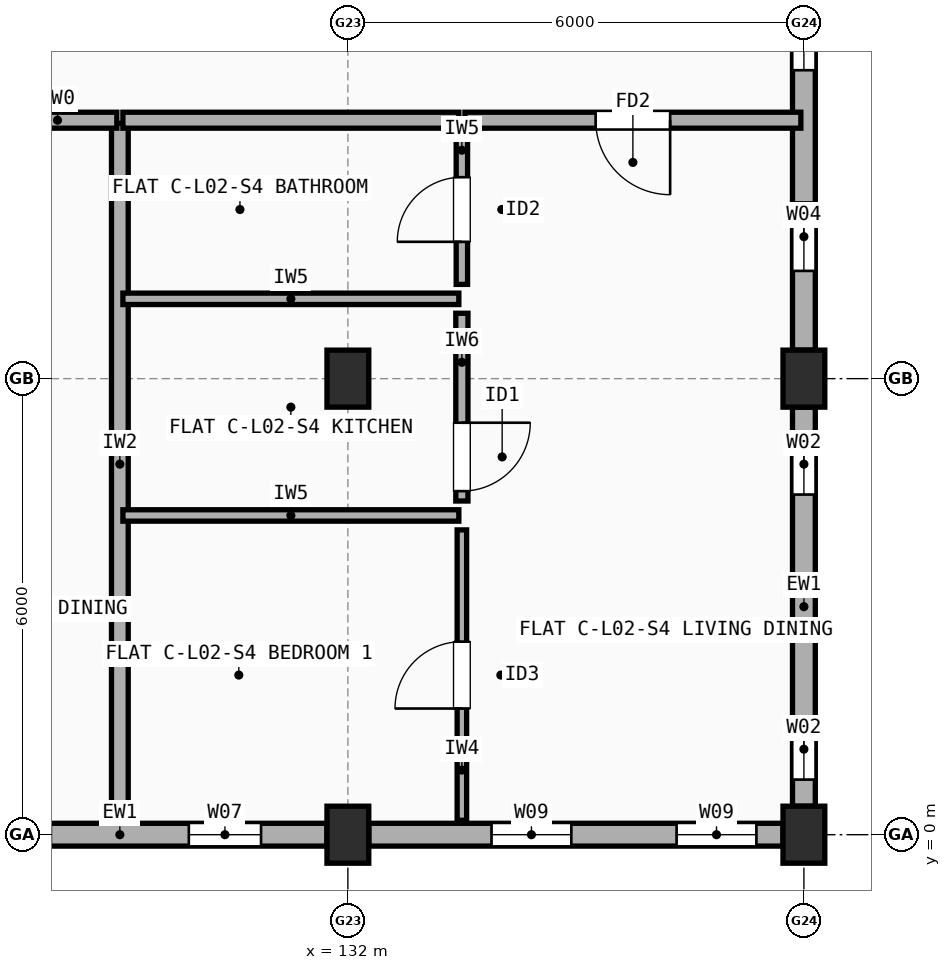
"""IFC4 building model, lengths in metres.
Left out: names, types, materials, properties, quantities, classifications, styles, units other than length and angle.
Written with IfcOpenShell. Run it as: python <this file> out.ifc"""

import sys

from ifc_helpers import new_model, si_unit, direction, frame, frame_2d, origin, origin_2d, place, context, subcontext, project, spatial, rectangle, extrude, element, fill, save


model = new_model("IFC4")
c1 = context("Model", 3, precision=1e-05, world=origin(), true_north=direction((0.0, 1.0)))
c2 = subcontext(c1, "Body", "Model", "MODEL_VIEW")
j1 = project(units=[si_unit("LENGTHUNIT", "METRE"), si_unit("PLANEANGLEUNIT", "RADIAN")], contexts=[c1])
p1 = place(None, origin())
s1 = spatial("IfcSite", under=j1, at=p1, CompositionType="ELEMENT")
p2 = place(p1, origin())
s2 = spatial("IfcBuilding", under=s1, at=p2, CompositionType="ELEMENT")
p3 = place(p2, frame((0.0, 0.0, 7.7)))
s3 = spatial("IfcBuildingStorey", under=s2, at=p3, CompositionType="ELEMENT", Elevation=7.7)
for number, where, z_axis, x_axis in (
    (1, (132.0, 0.0, 0.0), (0.0, 0.0, 1.0), (1.0, 0.0, 0.0)),
    (2, (132.0, 6.0, 0.0), (0.0, 0.0, 1.0), (1.0, 0.0, 0.0)),
    (3, (138.0, 0.0, 0.0), (0.0, 0.0, 1.0), (1.0, 0.0, 0.0)),
    (4, (138.0, 6.0, 0.0), (0.0, 0.0, 1.0), (1.0, 0.0, 0.0)),
):
    element("IfcColumn", number, at=place(p3, frame(where, z_axis=z_axis, x_axis=x_axis)), inside=s3, PredefinedType="COLUMN", context=c2, shape_type="SweptSolid", body=[
        extrude(rectangle(XDim=0.55, YDim=0.75, at=origin_2d()), origin(), (0.0, 0.0, 1.0), 2.955),
    ])
p4 = place(p3, frame((126.325, 0.0, 0.0), z_axis=(0.0, 0.0, 1.0), x_axis=(1.0, 0.0, 0.0)))
e5 = element("IfcWall", 5, at=p4, inside=s3, PredefinedType="STANDARD", context=c2, shape_type="SweptSolid", body=[
    extrude(rectangle(XDim=5.4, YDim=0.3, at=frame_2d((2.7, 0.0))), origin(), (0.0, 0.0, 1.0), 2.437),
])
p5 = place(p4, frame((0.867, 0.0, 0.9)))
e6 = element("IfcOpeningElement", 6, at=p5, cuts=e5, PredefinedType="OPENING", context=c2, shape_type="SweptSolid", body=[
    extrude(rectangle(XDim=0.9, YDim=1.3, at=frame_2d((0.45, 0.65))), frame((0.0, 0.16, 0.0), z_axis=(0.0, -1.0, 0.0), x_axis=(1.0, 0.0, 0.0)), (0.0, 0.0, 1.0), 0.32),
])
p6 = place(p4, frame((3.583, 0.0, 0.9)))
e7 = element("IfcOpeningElement", 7, at=p6, cuts=e5, PredefinedType="OPENING", context=c2, shape_type="SweptSolid", body=[
    extrude(rectangle(XDim=0.95, YDim=1.35, at=frame_2d((0.475, 0.675))), frame((0.0, 0.16, 0.0), z_axis=(0.0, -1.0, 0.0), x_axis=(1.0, 0.0, 0.0)), (0.0, 0.0, 1.0), 0.32),
])
p7 = place(p3, frame((132.275, 0.0, 0.0), z_axis=(0.0, 0.0, 1.0), x_axis=(1.0, 0.0, 0.0)))
e8 = element("IfcWall", 8, at=p7, inside=s3, PredefinedType="STANDARD", context=c2, shape_type="SweptSolid", body=[
    extrude(rectangle(XDim=5.45, YDim=0.3, at=frame_2d((2.725, 0.0))), origin(), (0.0, 0.0, 1.0), 2.437),
])
p8 = place(p7, frame((1.615, 0.0, 0.9)))
e9 = element("IfcOpeningElement", 9, at=p8, cuts=e8, PredefinedType="OPENING", context=c2, shape_type="SweptSolid", body=[
    extrude(rectangle(XDim=1.05, YDim=1.35, at=frame_2d((0.525, 0.675))), frame((0.0, 0.16, 0.0), z_axis=(0.0, -1.0, 0.0), x_axis=(1.0, 0.0, 0.0)), (0.0, 0.0, 1.0), 0.32),
])
p9 = place(p7, frame((4.05, 0.0, 0.9)))
e10 = element("IfcOpeningElement", 10, at=p9, cuts=e8, PredefinedType="OPENING", context=c2, shape_type="SweptSolid", body=[
    extrude(rectangle(XDim=1.05, YDim=1.35, at=frame_2d((0.525, 0.675))), frame((0.0, 0.16, 0.0), z_axis=(0.0, -1.0, 0.0), x_axis=(1.0, 0.0, 0.0)), (0.0, 0.0, 1.0), 0.32),
])
p10 = place(p3, frame((138.0, 0.375, 0.0), z_axis=(0.0, 0.0, 1.0), x_axis=(0.0, 1.0, 0.0)))
e11 = element("IfcWall", 11, at=p10, inside=s3, PredefinedType="STANDARD", context=c2, shape_type="SweptSolid", body=[
    extrude(rectangle(XDim=5.25, YDim=0.3, at=frame_2d((2.625, 0.0))), origin(), (0.0, 0.0, 1.0), 2.437),
])
p11 = place(p10, frame((0.35, 0.0, 0.9)))
e12 = element("IfcOpeningElement", 12, at=p11, cuts=e11, PredefinedType="OPENING", context=c2, shape_type="SweptSolid", body=[
    extrude(rectangle(XDim=0.8, YDim=1.2, at=frame_2d((0.4, 0.6))), frame((0.0, 0.16, 0.0), z_axis=(0.0, -1.0, 0.0), x_axis=(1.0, 0.0, 0.0)), (0.0, 0.0, 1.0), 0.32),
])
p12 = place(p10, frame((4.1, 0.0, 0.9)))
e13 = element("IfcOpeningElement", 13, at=p12, cuts=e11, PredefinedType="OPENING", context=c2, shape_type="SweptSolid", body=[
    extrude(rectangle(XDim=0.8, YDim=1.2, at=frame_2d((0.4, 0.6))), frame((0.0, 0.16, 0.0), z_axis=(0.0, -1.0, 0.0), x_axis=(1.0, 0.0, 0.0)), (0.0, 0.0, 1.0), 0.32),
])
p13 = place(p3, frame((138.0, 6.375, 0.0), z_axis=(0.0, 0.0, 1.0), x_axis=(0.0, 1.0, 0.0)))
e14 = element("IfcWall", 14, at=p13, inside=s3, PredefinedType="STANDARD", context=c2, shape_type="SweptSolid", body=[
    extrude(rectangle(XDim=5.25, YDim=0.3, at=frame_2d((2.625, 0.0))), origin(), (0.0, 0.0, 1.0), 2.437),
])
p14 = place(p13, frame((1.042, 0.0, 0.9)))
e15 = element("IfcOpeningElement", 15, at=p14, cuts=e14, PredefinedType="OPENING", context=c2, shape_type="SweptSolid", body=[
    extrude(rectangle(XDim=0.9, YDim=1.3, at=frame_2d((0.45, 0.65))), frame((0.0, 0.16, 0.0), z_axis=(0.0, -1.0, 0.0), x_axis=(1.0, 0.0, 0.0)), (0.0, 0.0, 1.0), 0.32),
])
p15 = place(p13, frame((3.683, 0.0, 0.9)))
e16 = element("IfcOpeningElement", 16, at=p15, cuts=e14, PredefinedType="OPENING", context=c2, shape_type="SweptSolid", body=[
    extrude(rectangle(XDim=0.95, YDim=1.35, at=frame_2d((0.475, 0.675))), frame((0.0, 0.16, 0.0), z_axis=(0.0, -1.0, 0.0), x_axis=(1.0, 0.0, 0.0)), (0.0, 0.0, 1.0), 0.32),
])
p16 = place(p3, frame((129.0, 0.39, 0.0), z_axis=(0.0, 0.0, 1.0), x_axis=(0.0, 1.0, 0.0)))
e17 = element("IfcWall", 17, at=p16, inside=s3, PredefinedType="SOLIDWALL", context=c2, shape_type="SweptSolid", body=[
    extrude(rectangle(XDim=8.97, YDim=0.22, at=frame_2d((4.485, 0.0))), origin(), (0.0, 0.0, 1.0), 2.437),
])
p17 = place(p3, frame((124.54, 9.4, 0.0), z_axis=(0.0, 0.0, 1.0), x_axis=(1.0, 0.0, 0.0)))
e18 = element("IfcWall", 18, at=p17, inside=s3, PredefinedType="SOLIDWALL", context=c2, shape_type="SweptSolid", body=[
    extrude(rectangle(XDim=4.42, YDim=0.21, at=frame_2d((2.21, 0.0))), origin(), (0.0, 0.0, 1.0), 2.337),
])
p18 = place(p17, frame((1.71, 0.0, 0.0)))
e19 = element("IfcOpeningElement", 19, at=p18, cuts=e18, PredefinedType="OPENING", context=c2, shape_type="SweptSolid", body=[
    extrude(rectangle(XDim=1.0, YDim=2.15, at=frame_2d((0.5, 1.075))), frame((0.0, 0.115, 0.0), z_axis=(0.0, -1.0, 0.0), x_axis=(1.0, 0.0, 0.0)), (0.0, 0.0, 1.0), 0.23),
])
p19 = place(p3, frame((129.04, 9.4, 0.0), z_axis=(0.0, 0.0, 1.0), x_axis=(1.0, 0.0, 0.0)))
e20 = element("IfcWall", 20, at=p19, inside=s3, PredefinedType="SOLIDWALL", context=c2, shape_type="SweptSolid", body=[
    extrude(rectangle(XDim=4.42, YDim=0.21, at=frame_2d((2.21, 0.0))), origin(), (0.0, 0.0, 1.0), 2.437),
])
p20 = place(p3, frame((133.54, 9.4, 0.0), z_axis=(0.0, 0.0, 1.0), x_axis=(1.0, 0.0, 0.0)))
e21 = element("IfcWall", 21, at=p20, inside=s3, PredefinedType="SOLIDWALL", context=c2, shape_type="SweptSolid", body=[
    extrude(rectangle(XDim=4.42, YDim=0.21, at=frame_2d((2.21, 0.0))), origin(), (0.0, 0.0, 1.0), 2.437),
])
p21 = place(p20, frame((1.72, 0.0, 0.0)))
e22 = element("IfcOpeningElement", 22, at=p21, cuts=e21, PredefinedType="OPENING", context=c2, shape_type="SweptSolid", body=[
    extrude(rectangle(XDim=0.98, YDim=2.15, at=frame_2d((0.49, 1.075))), frame((0.0, 0.115, 0.0), z_axis=(0.0, -1.0, 0.0), x_axis=(1.0, 0.0, 0.0)), (0.0, 0.0, 1.0), 0.23),
])
p22 = place(p3, frame((133.5, 0.19, 0.0), z_axis=(0.0, 0.0, 1.0), x_axis=(0.0, 1.0, 0.0)))
e23 = element("IfcWall", 23, at=p22, inside=s3, PredefinedType="PARTITIONING", context=c2, shape_type="SweptSolid", body=[
    extrude(rectangle(XDim=3.82, YDim=0.125, at=frame_2d((1.91, 0.0))), origin(), (0.0, 0.0, 1.0), 2.955),
])
p23 = place(p22, frame((1.47, 0.0, 0.0)))
e24 = element("IfcOpeningElement", 24, at=p23, cuts=e23, PredefinedType="OPENING", context=c2, shape_type="SweptSolid", body=[
    extrude(rectangle(XDim=0.88, YDim=2.1, at=frame_2d((0.44, 1.05))), frame((0.0, 0.073, 0.0), z_axis=(0.0, -1.0, 0.0), x_axis=(1.0, 0.0, 0.0)), (0.0, 0.0, 1.0), 0.145),
])
p24 = place(p3, frame((133.5, 4.39, 0.0), z_axis=(0.0, 0.0, 1.0), x_axis=(0.0, 1.0, 0.0)))
e25 = element("IfcWall", 25, at=p24, inside=s3, PredefinedType="PLUMBINGWALL", context=c2, shape_type="SweptSolid", body=[
    extrude(rectangle(XDim=2.47, YDim=0.16, at=frame_2d((1.235, 0.0))), origin(), (0.0, 0.0, 1.0), 2.437),
])
p25 = place(p24, frame((0.13, 0.0, 0.0)))
e26 = element("IfcOpeningElement", 26, at=p25, cuts=e25, PredefinedType="OPENING", context=c2, shape_type="SweptSolid", body=[
    extrude(rectangle(XDim=0.9, YDim=2.1, at=frame_2d((0.45, 1.05))), frame((0.0, 0.09, 0.0), z_axis=(0.0, -1.0, 0.0), x_axis=(1.0, 0.0, 0.0)), (0.0, 0.0, 1.0), 0.18),
])
p26 = place(p3, frame((133.5, 7.24, 0.0), z_axis=(0.0, 0.0, 1.0), x_axis=(0.0, 1.0, 0.0)))
e27 = element("IfcWall", 27, at=p26, inside=s3, PredefinedType="PARTITIONING", context=c2, shape_type="SweptSolid", body=[
    extrude(rectangle(XDim=1.97, YDim=0.15, at=frame_2d((0.985, 0.0))), origin(), (0.0, 0.0, 1.0), 2.955),
])
p27 = place(p26, frame((0.56, 0.0, 0.0)))
e28 = element("IfcOpeningElement", 28, at=p27, cuts=e27, PredefinedType="OPENING", context=c2, shape_type="SweptSolid", body=[
    extrude(rectangle(XDim=0.85, YDim=2.1, at=frame_2d((0.425, 1.05))), frame((0.0, 0.085, 0.0), z_axis=(0.0, -1.0, 0.0), x_axis=(1.0, 0.0, 0.0)), (0.0, 0.0, 1.0), 0.17),
])
for number, where, z_axis, x_axis in (
    (29, (129.04, 4.2, 0.0), (0.0, 0.0, 1.0), (1.0, 0.0, 0.0)),
    (30, (129.04, 7.05, 0.0), (0.0, 0.0, 1.0), (1.0, 0.0, 0.0)),
):
    element("IfcWall", number, at=place(p3, frame(where, z_axis=z_axis, x_axis=x_axis)), inside=s3, PredefinedType="PARTITIONING", context=c2, shape_type="SweptSolid", body=[
        extrude(rectangle(XDim=4.42, YDim=0.15, at=frame_2d((2.21, 0.0))), origin(), (0.0, 0.0, 1.0), 2.437),
    ])
p28 = place(p6, origin())
e31 = element("IfcWindow", 31, at=p28, inside=s3, PartitioningType="SINGLE_PANEL", PredefinedType="WINDOW", context=c2, shape_type="SweptSolid", body=[
    extrude(rectangle(XDim=0.95, YDim=1.35, at=frame_2d((0.475, 0.675))), frame((0.0, 0.03, 0.0), z_axis=(0.0, -1.0, 0.0), x_axis=(1.0, 0.0, 0.0)), (0.0, 0.0, 1.0), 0.06),
])
fill(e7, e31)
p29 = place(p8, origin())
e32 = element("IfcWindow", 32, at=p29, inside=s3, PartitioningType="SINGLE_PANEL", PredefinedType="WINDOW", context=c2, shape_type="SweptSolid", body=[
    extrude(rectangle(XDim=1.05, YDim=1.35, at=frame_2d((0.525, 0.675))), frame((0.0, 0.03, 0.0), z_axis=(0.0, -1.0, 0.0), x_axis=(1.0, 0.0, 0.0)), (0.0, 0.0, 1.0), 0.06),
])
fill(e9, e32)
p30 = place(p9, origin())
e33 = element("IfcWindow", 33, at=p30, inside=s3, PartitioningType="SINGLE_PANEL", PredefinedType="WINDOW", context=c2, shape_type="SweptSolid", body=[
    extrude(rectangle(XDim=1.05, YDim=1.35, at=frame_2d((0.525, 0.675))), frame((0.0, 0.03, 0.0), z_axis=(0.0, -1.0, 0.0), x_axis=(1.0, 0.0, 0.0)), (0.0, 0.0, 1.0), 0.06),
])
fill(e10, e33)
p31 = place(p11, origin())
e34 = element("IfcWindow", 34, at=p31, inside=s3, PartitioningType="SINGLE_PANEL", PredefinedType="WINDOW", context=c2, shape_type="SweptSolid", body=[
    extrude(rectangle(XDim=0.8, YDim=1.2, at=frame_2d((0.4, 0.6))), frame((0.0, 0.03, 0.0), z_axis=(0.0, -1.0, 0.0), x_axis=(1.0, 0.0, 0.0)), (0.0, 0.0, 1.0), 0.06),
])
fill(e12, e34)
p32 = place(p12, origin())
e35 = element("IfcWindow", 35, at=p32, inside=s3, PartitioningType="SINGLE_PANEL", PredefinedType="WINDOW", context=c2, shape_type="SweptSolid", body=[
    extrude(rectangle(XDim=0.8, YDim=1.2, at=frame_2d((0.4, 0.6))), frame((0.0, 0.03, 0.0), z_axis=(0.0, -1.0, 0.0), x_axis=(1.0, 0.0, 0.0)), (0.0, 0.0, 1.0), 0.06),
])
fill(e13, e35)
p33 = place(p14, origin())
e36 = element("IfcWindow", 36, at=p33, inside=s3, PartitioningType="SINGLE_PANEL", PredefinedType="WINDOW", context=c2, shape_type="SweptSolid", body=[
    extrude(rectangle(XDim=0.9, YDim=1.3, at=frame_2d((0.45, 0.65))), frame((0.0, 0.03, 0.0), z_axis=(0.0, -1.0, 0.0), x_axis=(1.0, 0.0, 0.0)), (0.0, 0.0, 1.0), 0.06),
])
fill(e15, e36)
p34 = place(p15, origin())
e37 = element("IfcWindow", 37, at=p34, inside=s3, PartitioningType="SINGLE_PANEL", PredefinedType="WINDOW", context=c2, shape_type="SweptSolid", body=[
    extrude(rectangle(XDim=0.95, YDim=1.35, at=frame_2d((0.475, 0.675))), frame((0.0, 0.03, 0.0), z_axis=(0.0, -1.0, 0.0), x_axis=(1.0, 0.0, 0.0)), (0.0, 0.0, 1.0), 0.06),
])
fill(e16, e37)
p35 = place(p21, origin())
e38 = element("IfcDoor", 38, at=p35, inside=s3, OperationType="SINGLE_SWING_RIGHT", PredefinedType="DOOR", context=c2, shape_type="SweptSolid", body=[
    extrude(rectangle(XDim=0.98, YDim=2.15, at=frame_2d((0.49, 1.075))), frame((0.0, 0.025, 0.0), z_axis=(0.0, -1.0, 0.0), x_axis=(1.0, 0.0, 0.0)), (0.0, 0.0, 1.0), 0.05),
])
fill(e22, e38)
p36 = place(p23, origin())
e39 = element("IfcDoor", 39, at=p36, inside=s3, OperationType="SINGLE_SWING_LEFT", PredefinedType="DOOR", context=c2, shape_type="SweptSolid", body=[
    extrude(rectangle(XDim=0.88, YDim=2.1, at=frame_2d((0.44, 1.05))), frame((0.0, 0.025, 0.0), z_axis=(0.0, -1.0, 0.0), x_axis=(1.0, 0.0, 0.0)), (0.0, 0.0, 1.0), 0.05),
])
fill(e24, e39)
p37 = place(p25, origin())
e40 = element("IfcDoor", 40, at=p37, inside=s3, OperationType="SINGLE_SWING_RIGHT", PredefinedType="DOOR", context=c2, shape_type="SweptSolid", body=[
    extrude(rectangle(XDim=0.9, YDim=2.1, at=frame_2d((0.45, 1.05))), frame((0.0, 0.025, 0.0), z_axis=(0.0, -1.0, 0.0), x_axis=(1.0, 0.0, 0.0)), (0.0, 0.0, 1.0), 0.05),
])
fill(e26, e40)
p38 = place(p27, origin())
e41 = element("IfcDoor", 41, at=p38, inside=s3, OperationType="SINGLE_SWING_LEFT", PredefinedType="DOOR", context=c2, shape_type="SweptSolid", body=[
    extrude(rectangle(XDim=0.85, YDim=2.1, at=frame_2d((0.425, 1.05))), frame((0.0, 0.025, 0.0), z_axis=(0.0, -1.0, 0.0), x_axis=(1.0, 0.0, 0.0)), (0.0, 0.0, 1.0), 0.05),
])
fill(e28, e41)
save(model, sys.argv[1])
